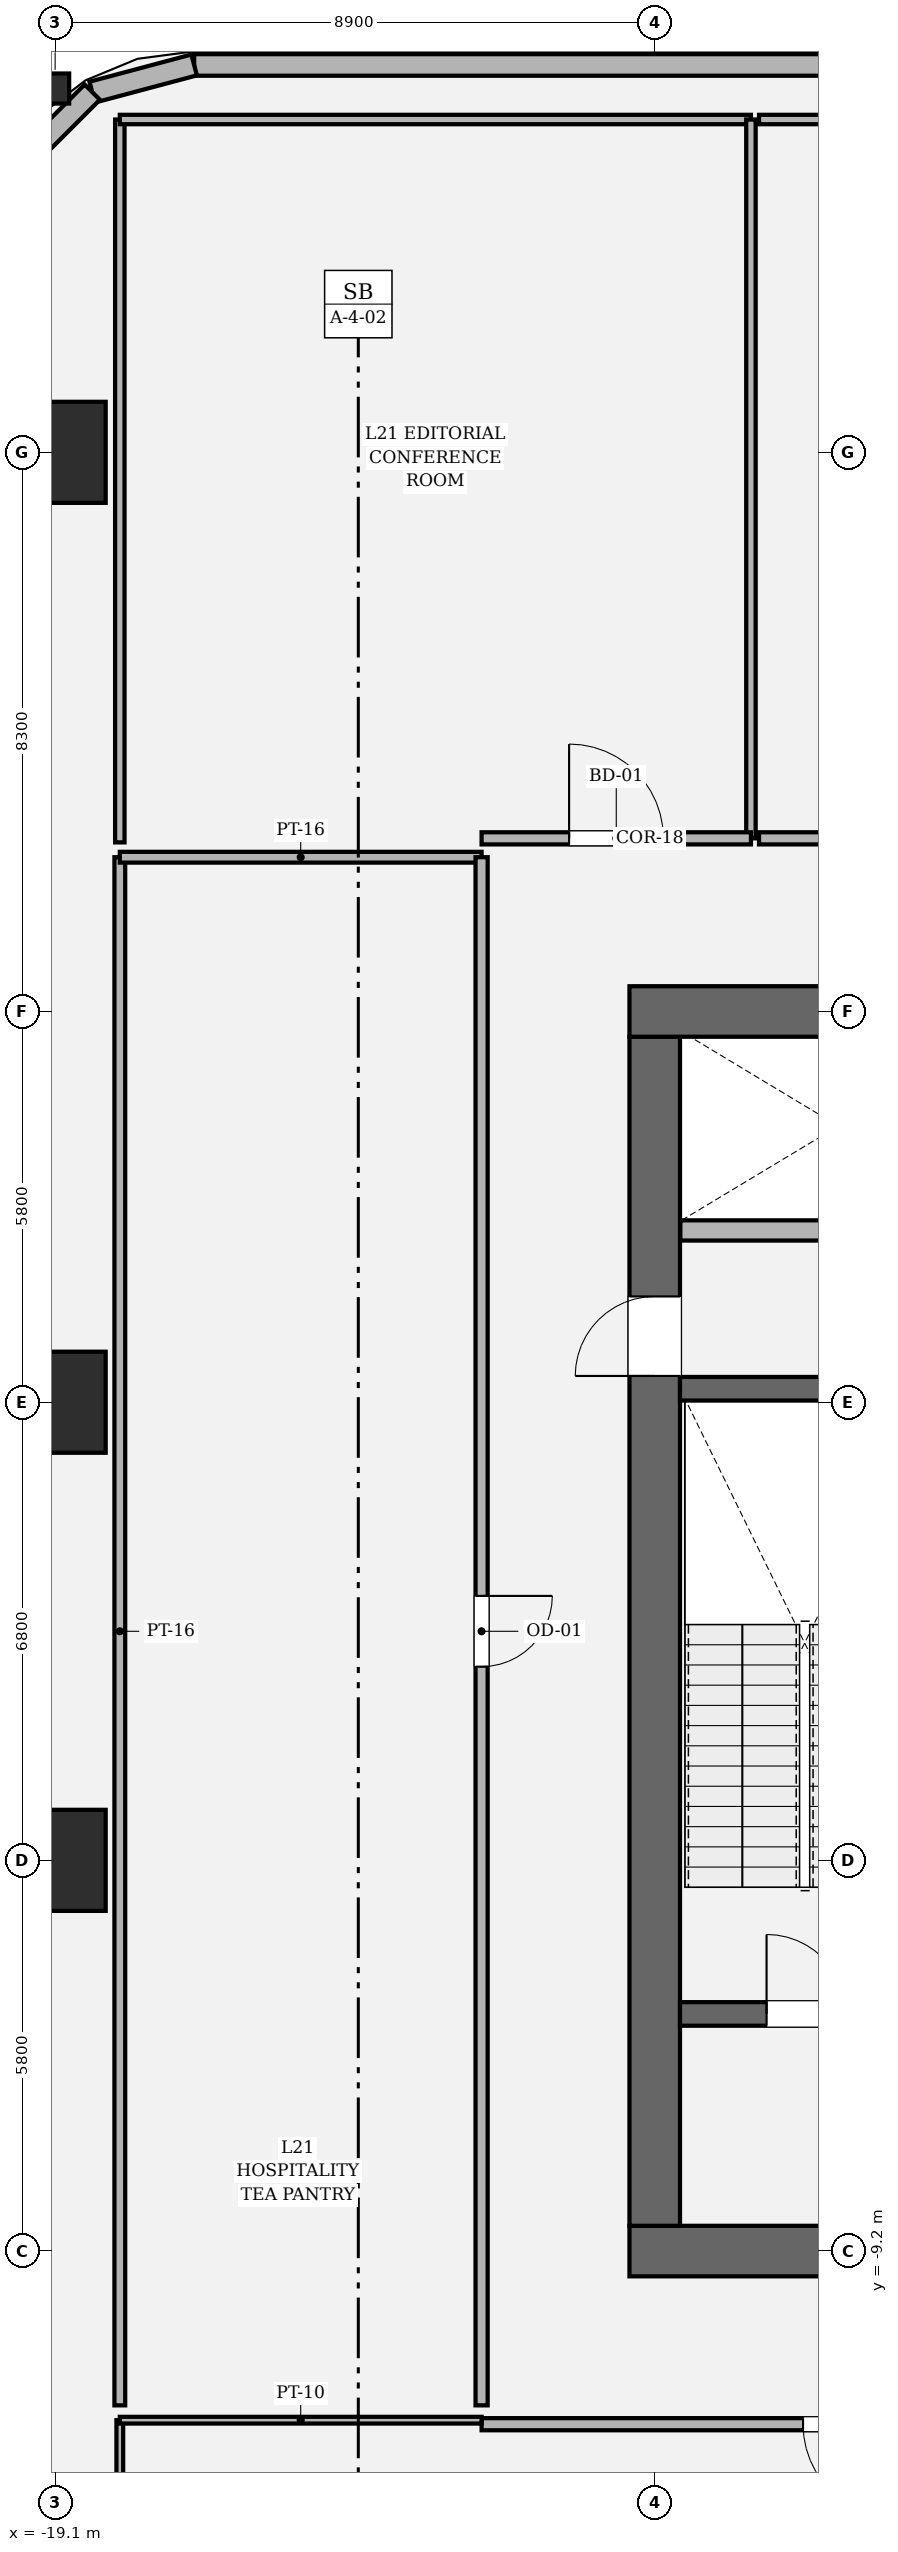
"""IFC4 building model, lengths in metres.
Left out: names, types, materials, properties, quantities, classifications, styles, units other than length and angle.
Written with IfcOpenShell. Run it as: python <this file> out.ifc"""

import sys

from ifc_helpers import new_model, si_unit, direction, frame, frame_2d, origin, origin_2d, place, context, subcontext, project, spatial, rectangle, hollow_rectangle, i_section, extrude, element, fill, save


model = new_model("IFC4")
c1 = context("Model", 3, precision=1e-05, world=origin(), true_north=direction((0.0, 1.0)))
c2 = subcontext(c1, "Body", "Model", "MODEL_VIEW")
j1 = project(units=[si_unit("LENGTHUNIT", "METRE"), si_unit("PLANEANGLEUNIT", "RADIAN")], contexts=[c1])
p1 = place(None, origin())
s1 = spatial("IfcSite", under=j1, at=p1, CompositionType="ELEMENT")
p2 = place(p1, origin())
s2 = spatial("IfcBuilding", under=s1, at=p2, CompositionType="ELEMENT")
p3 = place(p2, frame((0.0, 0.0, 93.0)))
s3 = spatial("IfcBuildingStorey", under=s2, at=p3, CompositionType="ELEMENT", Elevation=93.0)
p4 = place(p3, frame((10.575, -9.2, 0.0), z_axis=(0.0, 0.0, 1.0), x_axis=(-1.0, 0.0, 0.0)))
e1 = element("IfcWall", 1, at=p4, inside=s3, PredefinedType="SHEAR", context=c2, shape_type="SweptSolid", body=[
    extrude(rectangle(XDim=21.15, YDim=0.75, at=frame_2d((10.575, 0.0))), origin(), (0.0, 0.0, 1.0), 4.05),
])
p5 = place(p4, frame((2.85, 0.0, 0.0)))
e2 = element("IfcOpeningElement", 2, at=p5, cuts=e1, PredefinedType="OPENING", context=c2, shape_type="SweptSolid", body=[
    extrude(rectangle(XDim=1.25, YDim=2.25, at=frame_2d((0.625, 1.125))), frame((0.0, 0.385, 0.0), z_axis=(0.0, -1.0, 0.0), x_axis=(1.0, 0.0, 0.0)), (0.0, 0.0, 1.0), 0.77),
])
p6 = place(p4, frame((17.05, 0.0, 0.0)))
e3 = element("IfcOpeningElement", 3, at=p6, cuts=e1, PredefinedType="OPENING", context=c2, shape_type="SweptSolid", body=[
    extrude(rectangle(XDim=1.25, YDim=2.25, at=frame_2d((0.625, 1.125))), frame((0.0, 0.385, 0.0), z_axis=(0.0, -1.0, 0.0), x_axis=(1.0, 0.0, 0.0)), (0.0, 0.0, 1.0), 0.77),
])
p7 = place(p3, frame((-10.2, -8.825, 0.0), z_axis=(0.0, 0.0, 1.0), x_axis=(0.0, 1.0, 0.0)))
e4 = element("IfcWall", 4, at=p7, inside=s3, PredefinedType="SHEAR", context=c2, shape_type="SweptSolid", body=[
    extrude(rectangle(XDim=17.65, YDim=0.75, at=frame_2d((8.825, 0.0))), origin(), (0.0, 0.0, 1.0), 4.05),
])
p8 = place(p7, frame((12.615, 0.0, 0.0)))
e5 = element("IfcOpeningElement", 5, at=p8, cuts=e4, PredefinedType="OPENING", context=c2, shape_type="SweptSolid", body=[
    extrude(rectangle(XDim=1.18, YDim=2.2, at=frame_2d((0.59, 1.1))), frame((0.0, 0.385, 0.0), z_axis=(0.0, -1.0, 0.0), x_axis=(1.0, 0.0, 0.0)), (0.0, 0.0, 1.0), 0.77),
])
p9 = place(p3, frame((-10.575, 9.2, 0.0), z_axis=(0.0, 0.0, 1.0), x_axis=(1.0, 0.0, 0.0)))
e6 = element("IfcWall", 6, at=p9, inside=s3, PredefinedType="SHEAR", context=c2, shape_type="SweptSolid", body=[
    extrude(rectangle(XDim=21.15, YDim=0.75, at=frame_2d((10.575, 0.0))), origin(), (0.0, 0.0, 1.0), 4.05),
])
p10 = place(p3, frame((-9.825, -5.68, 0.0), z_axis=(0.0, 0.0, 1.0), x_axis=(1.0, 0.0, 0.0)))
e7 = element("IfcWall", 7, at=p10, inside=s3, PredefinedType="SOLIDWALL", context=c2, shape_type="SweptSolid", body=[
    extrude(rectangle(XDim=5.175, YDim=0.35, at=frame_2d((2.587, 0.0))), origin(), (0.0, 0.0, 1.0), 4.05),
])
p11 = place(p10, frame((1.285, 0.0, 0.0)))
e8 = element("IfcOpeningElement", 8, at=p11, cuts=e7, PredefinedType="OPENING", context=c2, shape_type="SweptSolid", body=[
    extrude(rectangle(XDim=1.18, YDim=2.2, at=frame_2d((0.59, 1.1))), frame((0.0, 0.185, 0.0), z_axis=(0.0, -1.0, 0.0), x_axis=(1.0, 0.0, 0.0)), (0.0, 0.0, 1.0), 0.37),
])
p12 = place(p3, frame((-9.825, 3.6, 0.0), z_axis=(0.0, 0.0, 1.0), x_axis=(1.0, 0.0, 0.0)))
e9 = element("IfcWall", 9, at=p12, inside=s3, PredefinedType="SOLIDWALL", context=c2, shape_type="SweptSolid", body=[
    extrude(rectangle(XDim=5.175, YDim=0.35, at=frame_2d((2.587, 0.0))), origin(), (0.0, 0.0, 1.0), 4.05),
])
for number, where, z_axis, x_axis in (
    (10, (-19.1, 17.5, 0.0), (0.0, 0.0, 1.0), (1.0, 0.0, 0.0)),
    (11, (-19.1, 3.4, 0.0), (0.0, 0.0, 1.0), (1.0, 0.0, 0.0)),
    (12, (-19.1, -3.4, 0.0), (0.0, 0.0, 1.0), (1.0, 0.0, 0.0)),
):
    element("IfcColumn", number, at=place(p3, frame(where, z_axis=z_axis, x_axis=x_axis)), inside=s3, PredefinedType="COLUMN", context=c2, shape_type="SweptSolid", body=[
        extrude(hollow_rectangle(XDim=1.5, YDim=1.5, WallThickness=0.045, at=origin_2d()), origin(), (0.0, 0.0, 1.0), 4.05),
    ])
p13 = place(p3, frame((-19.1, 22.9, 0.0), z_axis=(0.0, 0.0, 1.0), x_axis=(1.0, 0.0, 0.0)))
e13 = element("IfcColumn", 13, at=p13, inside=s3, PredefinedType="COLUMN", context=c2, shape_type="SweptSolid", body=[
    extrude(i_section(OverallWidth=0.416, OverallDepth=0.446, WebThickness=0.039, FlangeThickness=0.062, FilletRadius=0.018, at=origin_2d()), origin(), (0.0, 0.0, 1.0), 4.048),
])
p14 = place(p3, frame((-3.15, 23.25, 0.0), z_axis=(0.0, 0.0, 1.0), x_axis=(-1.0, 0.0, 0.0)))
e14 = element("IfcWall", 14, at=p14, inside=s3, PredefinedType="SOLIDWALL", context=c2, shape_type="SweptSolid", body=[
    extrude(rectangle(XDim=13.887, YDim=0.32, at=frame_2d((6.943, 0.0))), origin(), (0.0, 0.0, 1.0), 2.524),
])
p15 = place(p3, frame((-17.037, 23.25, 0.0), z_axis=(0.0, 0.0, 1.0), x_axis=(-0.966224582397, -0.257701486942, 0.0)))
e15 = element("IfcWall", 15, at=p15, inside=s3, PredefinedType="SOLIDWALL", context=c2, shape_type="SweptSolid", body=[
    extrude(rectangle(XDim=1.565, YDim=0.32, at=frame_2d((0.783, 0.0))), origin(), (0.0, 0.0, 1.0), 2.524),
])
p16 = place(p3, frame((-18.549, 22.847, 0.0), z_axis=(0.0, 0.0, 1.0), x_axis=(-0.707028130747, -0.707185422879, 0.0)))
e16 = element("IfcWall", 16, at=p16, inside=s3, PredefinedType="SOLIDWALL", context=c2, shape_type="SweptSolid", body=[
    extrude(rectangle(XDim=1.552, YDim=0.32, at=frame_2d((0.776, 0.0))), origin(), (0.0, 0.0, 1.0), 2.484),
])
p17 = place(p3, frame((-9.82, 5.95, 0.0), z_axis=(0.0, 0.0, 1.0), x_axis=(1.0, 0.0, 0.0)))
e17 = element("IfcWall", 17, at=p17, inside=s3, PredefinedType="SOLIDWALL", context=c2, shape_type="SweptSolid", body=[
    extrude(rectangle(XDim=4.76, YDim=0.3, at=frame_2d((2.38, 0.0))), origin(), (0.0, 0.0, 1.0), 3.81),
])
p18 = place(p3, frame((-12.77, -11.77, 0.0), z_axis=(0.0, 0.0, 1.0), x_axis=(1.0, 0.0, 0.0)))
e18 = element("IfcWall", 18, at=p18, inside=s3, PredefinedType="PARTITIONING", context=c2, shape_type="SweptSolid", body=[
    extrude(rectangle(XDim=10.943, YDim=0.18, at=frame_2d((5.472, 0.0))), origin(), (0.0, 0.0, 1.0), 3.104),
])
p19 = place(p18, frame((4.771, 0.0, 0.0)))
e19 = element("IfcOpeningElement", 19, at=p19, cuts=e18, PredefinedType="OPENING", context=c2, shape_type="SweptSolid", body=[
    extrude(rectangle(XDim=1.4, YDim=2.25, at=frame_2d((0.7, 1.125))), frame((0.0, 0.1, 0.0), z_axis=(0.0, -1.0, 0.0), x_axis=(1.0, 0.0, 0.0)), (0.0, 0.0, 1.0), 0.2),
])
p20 = place(p3, frame((-18.14, -16.54, 0.0), z_axis=(0.0, 0.0, 1.0), x_axis=(0.0, 1.0, 0.0)))
e20 = element("IfcWall", 20, at=p20, inside=s3, PredefinedType="PARTITIONING", context=c2, shape_type="SweptSolid", body=[
    extrude(rectangle(XDim=4.83, YDim=0.1, at=frame_2d((2.415, 0.0))), origin(), (0.0, 0.0, 1.0), 3.354),
])
p21 = place(p3, frame((-18.14, -11.71, 0.0), z_axis=(0.0, 0.0, 1.0), x_axis=(1.0, 0.0, 0.0)))
e21 = element("IfcWall", 21, at=p21, inside=s3, PredefinedType="PARTITIONING", context=c2, shape_type="SweptSolid", body=[
    extrude(rectangle(XDim=5.37, YDim=0.1, at=frame_2d((2.685, 0.0))), origin(), (0.0, 0.0, 1.0), 3.354),
])
p22 = place(p3, frame((-18.14, -11.49, 0.0), z_axis=(0.0, 0.0, 1.0), x_axis=(0.0, 1.0, 0.0)))
e22 = element("IfcWall", 22, at=p22, inside=s3, PredefinedType="PARTITIONING", context=c2, shape_type="SweptSolid", body=[
    extrude(rectangle(XDim=22.98, YDim=0.16, at=frame_2d((11.49, 0.0))), origin(), (0.0, 0.0, 1.0), 3.104),
])
p23 = place(p3, frame((-18.14, 11.49, 0.0), z_axis=(0.0, 0.0, 1.0), x_axis=(1.0, 0.0, 0.0)))
e23 = element("IfcWall", 23, at=p23, inside=s3, PredefinedType="PARTITIONING", context=c2, shape_type="SweptSolid", body=[
    extrude(rectangle(XDim=5.37, YDim=0.16, at=frame_2d((2.685, 0.0))), origin(), (0.0, 0.0, 1.0), 3.354),
])
p24 = place(p3, frame((-12.77, 11.49, 0.0), z_axis=(0.0, 0.0, 1.0), x_axis=(0.0, -1.0, 0.0)))
e24 = element("IfcWall", 24, at=p24, inside=s3, PredefinedType="PARTITIONING", context=c2, shape_type="SweptSolid", body=[
    extrude(rectangle(XDim=22.98, YDim=0.18, at=frame_2d((11.49, 0.0))), origin(), (0.0, 0.0, 1.0), 3.104),
])
p25 = place(p24, frame((10.965, 0.0, 0.0)))
e25 = element("IfcOpeningElement", 25, at=p25, cuts=e24, PredefinedType="OPENING", context=c2, shape_type="SweptSolid", body=[
    extrude(rectangle(XDim=1.05, YDim=2.2, at=frame_2d((0.525, 1.1))), frame((0.0, 0.1, 0.0), z_axis=(0.0, -1.0, 0.0), x_axis=(1.0, 0.0, 0.0)), (0.0, 0.0, 1.0), 0.2),
])
p26 = place(p3, frame((-18.14, 11.71, 0.0), z_axis=(0.0, 0.0, 1.0), x_axis=(0.0, 1.0, 0.0)))
e26 = element("IfcWall", 26, at=p26, inside=s3, PredefinedType="PARTITIONING", context=c2, shape_type="SweptSolid", body=[
    extrude(rectangle(XDim=10.73, YDim=0.14, at=frame_2d((5.365, 0.0))), origin(), (0.0, 0.0, 1.0), 3.104),
])
p27 = place(p3, frame((-18.14, 22.44, 0.0), z_axis=(0.0, 0.0, 1.0), x_axis=(1.0, 0.0, 0.0)))
e27 = element("IfcWall", 27, at=p27, inside=s3, PredefinedType="PARTITIONING", context=c2, shape_type="SweptSolid", body=[
    extrude(rectangle(XDim=9.368, YDim=0.14, at=frame_2d((4.684, 0.0))), origin(), (0.0, 0.0, 1.0), 3.81),
])
p28 = place(p3, frame((-8.772, 22.44, 0.0), z_axis=(0.0, 0.0, 1.0), x_axis=(0.0, -1.0, 0.0)))
e28 = element("IfcWall", 28, at=p28, inside=s3, PredefinedType="PARTITIONING", context=c2, shape_type="SweptSolid", body=[
    extrude(rectangle(XDim=10.67, YDim=0.14, at=frame_2d((5.335, 0.0))), origin(), (0.0, 0.0, 1.0), 3.104),
])
p29 = place(p3, frame((-8.772, 11.77, 0.0), z_axis=(0.0, 0.0, 1.0), x_axis=(-1.0, 0.0, 0.0)))
e29 = element("IfcWall", 29, at=p29, inside=s3, PredefinedType="PARTITIONING", context=c2, shape_type="SweptSolid", body=[
    extrude(rectangle(XDim=3.998, YDim=0.18, at=frame_2d((1.999, 0.0))), origin(), (0.0, 0.0, 1.0), 3.104),
])
p30 = place(p29, frame((1.299, 0.0, 0.0)))
e30 = element("IfcOpeningElement", 30, at=p30, cuts=e29, PredefinedType="OPENING", context=c2, shape_type="SweptSolid", body=[
    extrude(rectangle(XDim=1.4, YDim=2.25, at=frame_2d((0.7, 1.125))), frame((0.0, 0.1, 0.0), z_axis=(0.0, -1.0, 0.0), x_axis=(1.0, 0.0, 0.0)), (0.0, 0.0, 1.0), 0.2),
])
p31 = place(p3, frame((-8.652, 22.44, 0.0), z_axis=(0.0, 0.0, 1.0), x_axis=(1.0, 0.0, 0.0)))
e31 = element("IfcWall", 31, at=p31, inside=s3, PredefinedType="PARTITIONING", context=c2, shape_type="SweptSolid", body=[
    extrude(rectangle(XDim=13.77, YDim=0.14, at=frame_2d((6.885, 0.0))), origin(), (0.0, 0.0, 1.0), 2.484),
])
p32 = place(p3, frame((5.118, 11.77, 0.0), z_axis=(0.0, 0.0, 1.0), x_axis=(-1.0, 0.0, 0.0)))
e32 = element("IfcWall", 32, at=p32, inside=s3, PredefinedType="PARTITIONING", context=c2, shape_type="SweptSolid", body=[
    extrude(rectangle(XDim=13.77, YDim=0.18, at=frame_2d((6.885, 0.0))), origin(), (0.0, 0.0, 1.0), 3.104),
])
p33 = place(p32, frame((6.36, 0.0, 0.0)))
e33 = element("IfcOpeningElement", 33, at=p33, cuts=e32, PredefinedType="OPENING", context=c2, shape_type="SweptSolid", body=[
    extrude(rectangle(XDim=1.05, YDim=2.2, at=frame_2d((0.525, 1.1))), frame((0.0, 0.1, 0.0), z_axis=(0.0, -1.0, 0.0), x_axis=(1.0, 0.0, 0.0)), (0.0, 0.0, 1.0), 0.2),
])
p34 = place(p11, origin())
e34 = element("IfcDoor", 34, at=p34, inside=s3, OperationType="SINGLE_SWING_LEFT", PredefinedType="DOOR", context=c2, shape_type="SweptSolid", body=[
    extrude(rectangle(XDim=1.18, YDim=2.2, at=frame_2d((0.59, 1.1))), frame((0.0, 0.025, 0.0), z_axis=(0.0, -1.0, 0.0), x_axis=(1.0, 0.0, 0.0)), (0.0, 0.0, 1.0), 0.05),
])
fill(e8, e34)
p35 = place(p8, origin())
e35 = element("IfcDoor", 35, at=p35, inside=s3, OperationType="SINGLE_SWING_LEFT", PredefinedType="DOOR", context=c2, shape_type="SweptSolid", body=[
    extrude(rectangle(XDim=1.18, YDim=2.2, at=frame_2d((0.59, 1.1))), frame((0.0, 0.025, 0.0), z_axis=(0.0, -1.0, 0.0), x_axis=(1.0, 0.0, 0.0)), (0.0, 0.0, 1.0), 0.05),
])
fill(e5, e35)
p36 = place(p19, origin())
e36 = element("IfcDoor", 36, at=p36, inside=s3, OperationType="SINGLE_SWING_RIGHT", PredefinedType="DOOR", context=c2, shape_type="SweptSolid", body=[
    extrude(rectangle(XDim=1.4, YDim=2.25, at=frame_2d((0.7, 1.125))), frame((0.0, 0.025, 0.0), z_axis=(0.0, -1.0, 0.0), x_axis=(1.0, 0.0, 0.0)), (0.0, 0.0, 1.0), 0.05),
])
fill(e19, e36)
p37 = place(p25, origin())
e37 = element("IfcDoor", 37, at=p37, inside=s3, OperationType="SINGLE_SWING_LEFT", PredefinedType="DOOR", context=c2, shape_type="SweptSolid", body=[
    extrude(rectangle(XDim=1.05, YDim=2.2, at=frame_2d((0.525, 1.1))), frame((0.0, 0.025, 0.0), z_axis=(0.0, -1.0, 0.0), x_axis=(1.0, 0.0, 0.0)), (0.0, 0.0, 1.0), 0.05),
])
fill(e25, e37)
p38 = place(p30, origin())
e38 = element("IfcDoor", 38, at=p38, inside=s3, OperationType="SINGLE_SWING_RIGHT", PredefinedType="DOOR", context=c2, shape_type="SweptSolid", body=[
    extrude(rectangle(XDim=1.4, YDim=2.25, at=frame_2d((0.7, 1.125))), frame((0.0, 0.025, 0.0), z_axis=(0.0, -1.0, 0.0), x_axis=(1.0, 0.0, 0.0)), (0.0, 0.0, 1.0), 0.05),
])
fill(e30, e38)
save(model, sys.argv[1])
